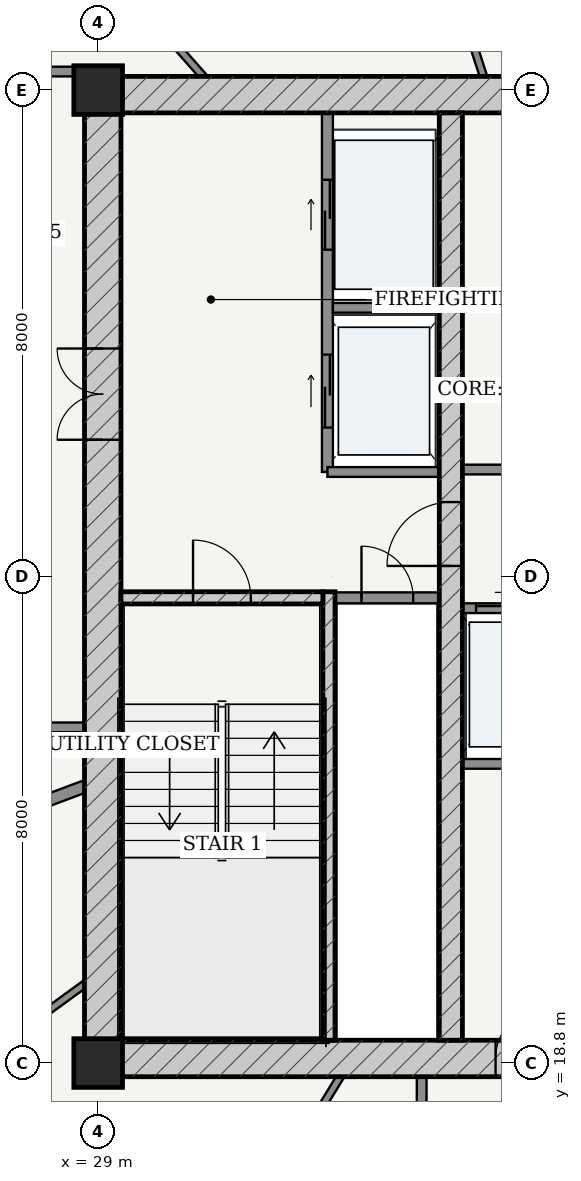
"""IFC4 building model, lengths in metres.
Left out: names, types, materials, properties, quantities, classifications, styles, units other than length and angle.
Written with IfcOpenShell. Run it as: python <this file> out.ifc"""

import sys

from ifc_helpers import new_model, si_unit, direction, frame, frame_2d, origin, origin_2d, place, context, subcontext, project, spatial, rectangle, extrude, source, transform, mapped, element, fill, save


model = new_model("IFC4")
c1 = context("Model", 3, precision=1e-05, world=origin(), true_north=direction((-0.2419218956, 0.970295726276)))
c2 = subcontext(c1, "Body", "Model", "MODEL_VIEW")
j1 = project(units=[si_unit("LENGTHUNIT", "METRE"), si_unit("PLANEANGLEUNIT", "RADIAN")], contexts=[c1])
p1 = place(None, origin())
s1 = spatial("IfcSite", under=j1, at=p1, CompositionType="ELEMENT")
p2 = place(p1, origin())
s2 = spatial("IfcBuilding", under=s1, at=p2, CompositionType="ELEMENT")
p3 = place(p2, frame((0.0, 0.0, 206.0)))
s3 = spatial("IfcBuildingStorey", under=s2, at=p3, CompositionType="ELEMENT", Elevation=206.0)
for number, where, z_axis, x_axis in (
    (1, (29.0, 18.8, 0.0), (0.0, 0.0, 1.0), (1.0, 0.0, 0.0)),
    (2, (29.0, 34.8, 0.0), (0.0, 0.0, 1.0), (1.0, 0.0, 0.0)),
):
    element("IfcColumn", number, at=place(p3, frame(where, z_axis=z_axis, x_axis=x_axis)), inside=s3, PredefinedType="COLUMN", context=c2, shape_type="SweptSolid", body=[
        extrude(rectangle(XDim=0.8, YDim=0.8, at=origin_2d()), origin(), (0.0, 0.0, 1.0), 3.7),
    ])
p4 = place(p3, frame((28.775, 18.875, 0.0), z_axis=(0.0, 0.0, 1.0), x_axis=(1.0, 0.0, 0.0)))
e3 = element("IfcWall", 3, at=p4, inside=s3, PredefinedType="SHEAR", context=c2, shape_type="SweptSolid", body=[
    extrude(rectangle(XDim=18.45, YDim=0.6, at=frame_2d((9.225, 0.0))), origin(), (0.0, 0.0, 1.0), 3.435),
])
p5 = place(p4, frame((6.76, 0.0, 0.0)))
e4 = element("IfcOpeningElement", 4, at=p5, cuts=e3, PredefinedType="OPENING", context=c2, shape_type="SweptSolid", body=[
    extrude(rectangle(XDim=0.85, YDim=2.1, at=frame_2d((0.425, 1.05))), frame((0.0, 0.31, 0.0), z_axis=(0.0, -1.0, 0.0), x_axis=(1.0, 0.0, 0.0)), (0.0, 0.0, 1.0), 0.62),
])
p6 = place(p4, frame((8.8, 0.0, 0.0)))
e5 = element("IfcOpeningElement", 5, at=p6, cuts=e3, PredefinedType="OPENING", context=c2, shape_type="SweptSolid", body=[
    extrude(rectangle(XDim=0.85, YDim=2.1, at=frame_2d((0.425, 1.05))), frame((0.0, 0.31, 0.0), z_axis=(0.0, -1.0, 0.0), x_axis=(1.0, 0.0, 0.0)), (0.0, 0.0, 1.0), 0.62),
])
p7 = place(p4, frame((10.84, 0.0, 0.0)))
e6 = element("IfcOpeningElement", 6, at=p7, cuts=e3, PredefinedType="OPENING", context=c2, shape_type="SweptSolid", body=[
    extrude(rectangle(XDim=0.85, YDim=2.1, at=frame_2d((0.425, 1.05))), frame((0.0, 0.31, 0.0), z_axis=(0.0, -1.0, 0.0), x_axis=(1.0, 0.0, 0.0)), (0.0, 0.0, 1.0), 0.62),
])
p8 = place(p3, frame((28.775, 34.725, 0.0), z_axis=(0.0, 0.0, 1.0), x_axis=(1.0, 0.0, 0.0)))
e7 = element("IfcWall", 7, at=p8, inside=s3, PredefinedType="SHEAR", context=c2, shape_type="SweptSolid", body=[
    extrude(rectangle(XDim=18.45, YDim=0.6, at=frame_2d((9.225, 0.0))), origin(), (0.0, 0.0, 1.0), 3.435),
])
p9 = place(p3, frame((29.075, 19.175, 0.0), z_axis=(0.0, 0.0, 1.0), x_axis=(0.0, 1.0, 0.0)))
e8 = element("IfcWall", 8, at=p9, inside=s3, PredefinedType="SHEAR", context=c2, shape_type="SweptSolid", body=[
    extrude(rectangle(XDim=15.25, YDim=0.6, at=frame_2d((7.625, 0.0))), origin(), (0.0, 0.0, 1.0), 3.435),
])
p10 = place(p9, frame((9.875, 0.0, 0.0)))
e9 = element("IfcOpeningElement", 9, at=p10, cuts=e8, PredefinedType="OPENING", context=c2, shape_type="SweptSolid", body=[
    extrude(rectangle(XDim=1.5, YDim=2.2, at=frame_2d((0.75, 1.1))), frame((0.0, 0.31, 0.0), z_axis=(0.0, -1.0, 0.0), x_axis=(1.0, 0.0, 0.0)), (0.0, 0.0, 1.0), 0.62),
])
p11 = place(p3, frame((32.795, 19.175, 0.0), z_axis=(0.0, 0.0, 1.0), x_axis=(0.0, 1.0, 0.0)))
e10 = element("IfcWall", 10, at=p11, inside=s3, PredefinedType="SOLIDWALL", context=c2, shape_type="SweptSolid", body=[
    extrude(rectangle(XDim=7.375, YDim=0.2, at=frame_2d((3.688, 0.0))), origin(), (0.0, 0.0, 1.0), 3.435),
])
p12 = place(p3, frame((29.375, 26.45, 0.0), z_axis=(0.0, 0.0, 1.0), x_axis=(1.0, 0.0, 0.0)))
e11 = element("IfcWall", 11, at=p12, inside=s3, PredefinedType="SOLIDWALL", context=c2, shape_type="SweptSolid", body=[
    extrude(rectangle(XDim=3.32, YDim=0.2, at=frame_2d((1.66, 0.0))), origin(), (0.0, 0.0, 1.0), 3.435),
])
p13 = place(p12, frame((1.185, 0.0, 0.0)))
e12 = element("IfcOpeningElement", 12, at=p13, cuts=e11, PredefinedType="OPENING", context=c2, shape_type="SweptSolid", body=[
    extrude(rectangle(XDim=0.95, YDim=2.15, at=frame_2d((0.475, 1.075))), frame((0.0, 0.11, 0.0), z_axis=(0.0, -1.0, 0.0), x_axis=(1.0, 0.0, 0.0)), (0.0, 0.0, 1.0), 0.22),
])
p14 = place(p3, frame((34.8, 19.175, 0.0), z_axis=(0.0, 0.0, 1.0), x_axis=(0.0, 1.0, 0.0)))
e13 = element("IfcWall", 13, at=p14, inside=s3, PredefinedType="SHEAR", context=c2, shape_type="SweptSolid", body=[
    extrude(rectangle(XDim=15.25, YDim=0.38, at=frame_2d((7.625, 0.0))), origin(), (0.0, 0.0, 1.0), 3.435),
])
p15 = place(p14, frame((7.8, 0.0, 0.0)))
e14 = element("IfcOpeningElement", 14, at=p15, cuts=e13, PredefinedType="OPENING", context=c2, shape_type="SweptSolid", body=[
    extrude(rectangle(XDim=1.05, YDim=2.15, at=frame_2d((0.525, 1.075))), frame((0.0, 0.2, 0.0), z_axis=(0.0, -1.0, 0.0), x_axis=(1.0, 0.0, 0.0)), (0.0, 0.0, 1.0), 0.4),
])
p16 = place(p3, frame((32.9, 26.45, 0.0), z_axis=(0.0, 0.0, 1.0), x_axis=(1.0, 0.0, 0.0)))
e15 = element("IfcWall", 15, at=p16, inside=s3, PredefinedType="PARTITIONING", context=c2, shape_type="SweptSolid", body=[
    extrude(rectangle(XDim=1.71, YDim=0.18, at=frame_2d((0.855, 0.0))), origin(), (0.0, 0.0, 1.0), 3.435),
])
p17 = place(p16, frame((0.43, 0.0, 0.0)))
e16 = element("IfcOpeningElement", 16, at=p17, cuts=e15, PredefinedType="OPENING", context=c2, shape_type="SweptSolid", body=[
    extrude(rectangle(XDim=0.85, YDim=2.1, at=frame_2d((0.425, 1.05))), frame((0.0, 0.1, 0.0), z_axis=(0.0, -1.0, 0.0), x_axis=(1.0, 0.0, 0.0)), (0.0, 0.0, 1.0), 0.2),
])
p18 = place(p3, frame((32.77, 28.52, 0.0), z_axis=(0.0, 0.0, 1.0), x_axis=(0.0, 1.0, 0.0)))
e17 = element("IfcWall", 17, at=p18, inside=s3, PredefinedType="PARTITIONING", context=c2, shape_type="SweptSolid", body=[
    extrude(rectangle(XDim=5.905, YDim=0.18, at=frame_2d((2.953, 0.0))), origin(), (0.0, 0.0, 1.0), 3.435),
])
p19 = place(p18, frame((3.655, 0.0, 0.0)))
e18 = element("IfcOpeningElement", 18, at=p19, cuts=e17, PredefinedType="OPENING", context=c2, shape_type="SweptSolid", body=[
    extrude(rectangle(XDim=1.15, YDim=2.2, at=frame_2d((0.575, 1.1))), frame((0.0, 0.1, 0.0), z_axis=(0.0, -1.0, 0.0), x_axis=(1.0, 0.0, 0.0)), (0.0, 0.0, 1.0), 0.2),
])
p20 = place(p18, frame((0.73, 0.0, 0.0)))
e19 = element("IfcOpeningElement", 19, at=p20, cuts=e17, PredefinedType="OPENING", context=c2, shape_type="SweptSolid", body=[
    extrude(rectangle(XDim=1.2, YDim=2.25, at=frame_2d((0.6, 1.125))), frame((0.0, 0.1, 0.0), z_axis=(0.0, -1.0, 0.0), x_axis=(1.0, 0.0, 0.0)), (0.0, 0.0, 1.0), 0.2),
])
p21 = place(p3, frame((32.86, 31.22, 0.0), z_axis=(0.0, 0.0, 1.0), x_axis=(1.0, 0.0, 0.0)))
e20 = element("IfcWall", 20, at=p21, inside=s3, PredefinedType="PARTITIONING", context=c2, shape_type="SweptSolid", body=[
    extrude(rectangle(XDim=1.75, YDim=0.16, at=frame_2d((0.875, 0.0))), origin(), (0.0, 0.0, 1.0), 3.435),
])
p22 = place(p3, frame((32.77, 28.52, 0.0), z_axis=(0.0, 0.0, 1.0), x_axis=(1.0, 0.0, 0.0)))
e21 = element("IfcWall", 21, at=p22, inside=s3, PredefinedType="PARTITIONING", context=c2, shape_type="SweptSolid", body=[
    extrude(rectangle(XDim=1.84, YDim=0.16, at=frame_2d((0.92, 0.0))), origin(), (0.0, 0.0, 1.0), 3.435),
])
p23 = place(p3, frame((34.99, 28.56, 0.0), z_axis=(0.0, 0.0, 1.0), x_axis=(1.0, 0.0, 0.0)))
e22 = element("IfcWall", 22, at=p23, inside=s3, PredefinedType="PARTITIONING", context=c2, shape_type="SweptSolid", body=[
    extrude(rectangle(XDim=6.02, YDim=0.16, at=frame_2d((3.01, 0.0))), origin(), (0.0, 0.0, 1.0), 3.435),
])
p24 = place(p23, frame((1.025, 0.0, 0.0)))
e23 = element("IfcOpeningElement", 23, at=p24, cuts=e22, PredefinedType="OPENING", context=c2, shape_type="SweptSolid", body=[
    extrude(rectangle(XDim=0.86, YDim=2.1, at=frame_2d((0.43, 1.05))), frame((0.0, 0.09, 0.0), z_axis=(0.0, -1.0, 0.0), x_axis=(1.0, 0.0, 0.0)), (0.0, 0.0, 1.0), 0.18),
])
p25 = place(p23, frame((4.14, 0.0, 0.0)))
e24 = element("IfcOpeningElement", 24, at=p25, cuts=e22, PredefinedType="OPENING", context=c2, shape_type="SweptSolid", body=[
    extrude(rectangle(XDim=0.85, YDim=2.1, at=frame_2d((0.425, 1.05))), frame((0.0, 0.09, 0.0), z_axis=(0.0, -1.0, 0.0), x_axis=(1.0, 0.0, 0.0)), (0.0, 0.0, 1.0), 0.18),
])
p26 = place(p3, frame((34.99, 26.28, 0.0), z_axis=(0.0, 0.0, 1.0), x_axis=(1.0, 0.0, 0.0)))
e25 = element("IfcWall", 25, at=p26, inside=s3, PredefinedType="PARTITIONING", context=c2, shape_type="SweptSolid", body=[
    extrude(rectangle(XDim=6.02, YDim=0.16, at=frame_2d((3.01, 0.0))), origin(), (0.0, 0.0, 1.0), 3.435),
])
p27 = place(p26, frame((0.225, 0.0, 0.0)))
e26 = element("IfcOpeningElement", 26, at=p27, cuts=e25, PredefinedType="OPENING", context=c2, shape_type="SweptSolid", body=[
    extrude(rectangle(XDim=1.1, YDim=2.2, at=frame_2d((0.55, 1.1))), frame((0.0, 0.09, 0.0), z_axis=(0.0, -1.0, 0.0), x_axis=(1.0, 0.0, 0.0)), (0.0, 0.0, 1.0), 0.18),
])
p28 = place(p26, frame((1.705, 0.0, 0.0)))
e27 = element("IfcOpeningElement", 27, at=p28, cuts=e25, PredefinedType="OPENING", context=c2, shape_type="SweptSolid", body=[
    extrude(rectangle(XDim=1.1, YDim=2.2, at=frame_2d((0.55, 1.1))), frame((0.0, 0.09, 0.0), z_axis=(0.0, -1.0, 0.0), x_axis=(1.0, 0.0, 0.0)), (0.0, 0.0, 1.0), 0.18),
])
p29 = place(p3, frame((34.99, 23.72, 0.0), z_axis=(0.0, 0.0, 1.0), x_axis=(1.0, 0.0, 0.0)))
e28 = element("IfcWall", 28, at=p29, inside=s3, PredefinedType="PARTITIONING", context=c2, shape_type="SweptSolid", body=[
    extrude(rectangle(XDim=6.02, YDim=0.16, at=frame_2d((3.01, 0.0))), origin(), (0.0, 0.0, 1.0), 3.435),
])
for number, where, z_axis, x_axis in (
    (29, (26.845, 35.105, 0.0), (0.0, 0.0, 1.0), (1.0, 0.0, 0.0)),
    (30, (26.845, 24.32, 0.0), (0.0, 0.0, 1.0), (1.0, 0.0, 0.0)),
):
    element("IfcWall", number, at=place(p3, frame(where, z_axis=z_axis, x_axis=x_axis)), inside=s3, PredefinedType="PARTITIONING", context=c2, shape_type="SweptSolid", body=[
        extrude(rectangle(XDim=1.93, YDim=0.16, at=frame_2d((0.965, 0.0))), origin(), (0.0, 0.0, 1.0), 3.435),
    ])
p30 = place(p3, frame((34.32, 16.725, 0.0), z_axis=(0.0, 0.0, 1.0), x_axis=(0.0, 1.0, 0.0)))
e31 = element("IfcWall", 31, at=p30, inside=s3, PredefinedType="PARTITIONING", context=c2, shape_type="SweptSolid", body=[
    extrude(rectangle(XDim=1.85, YDim=0.16, at=frame_2d((0.925, 0.0))), origin(), (0.0, 0.0, 1.0), 3.435),
])
p31 = place(p3, frame((35.336, 35.027, 0.0), z_axis=(0.0, 0.0, 1.0), x_axis=(-0.308083476138, 0.951359328398, 0.0)))
e32 = element("IfcWall", 32, at=p31, inside=s3, PredefinedType="PARTITIONING", context=c2, shape_type="SweptSolid", body=[
    extrude(rectangle(XDim=2.396, YDim=0.12, at=frame_2d((1.198, 0.0))), origin(), (0.0, 0.0, 1.0), 2.52),
])
p32 = place(p3, frame((30.726, 35.027, 0.0), z_axis=(0.0, 0.0, 1.0), x_axis=(-0.662398427862, 0.749151735475, 0.0)))
e33 = element("IfcWall", 33, at=p32, inside=s3, PredefinedType="PARTITIONING", context=c2, shape_type="SweptSolid", body=[
    extrude(rectangle(XDim=3.273, YDim=0.12, at=frame_2d((1.636, 0.0))), origin(), (0.0, 0.0, 1.0), 3.435),
])
p33 = place(p3, frame((28.775, 23.347, 0.0), z_axis=(0.0, 0.0, 1.0), x_axis=(-0.936537569358, -0.350567227761, 0.0)))
e34 = element("IfcWall", 34, at=p33, inside=s3, PredefinedType="PARTITIONING", context=c2, shape_type="SweptSolid", body=[
    extrude(rectangle(XDim=11.594, YDim=0.2, at=frame_2d((5.797, 0.0))), origin(), (0.0, 0.0, 1.0), 2.951),
])
p34 = place(p3, frame((28.775, 20.094, 0.0), z_axis=(0.0, 0.0, 1.0), x_axis=(-0.808862864425, -0.587997335499, 0.0)))
e35 = element("IfcWall", 35, at=p34, inside=s3, PredefinedType="PARTITIONING", context=c2, shape_type="SweptSolid", body=[
    extrude(rectangle(XDim=2.831, YDim=0.12, at=frame_2d((1.416, 0.0))), origin(), (0.0, 0.0, 1.0), 3.435),
])
p35 = place(p3, frame((32.981, 18.575, 0.0), z_axis=(0.0, 0.0, 1.0), x_axis=(-0.520926540997, -0.853601510592, 0.0)))
e36 = element("IfcWall", 36, at=p35, inside=s3, PredefinedType="PARTITIONING", context=c2, shape_type="SweptSolid", body=[
    extrude(rectangle(XDim=2.679, YDim=0.12, at=frame_2d((1.34, 0.0))), origin(), (0.0, 0.0, 1.0), 3.435),
])
m1 = source(origin(), c2, "Body", "SweptSolid", [
    extrude(rectangle(XDim=1.5, YDim=2.2, at=frame_2d((0.75, 1.1))), frame((0.0, 0.025, 0.0), z_axis=(0.0, -1.0, 0.0), x_axis=(1.0, 0.0, 0.0)), (0.0, 0.0, 1.0), 0.05),
])
p36 = place(p10, origin())
e37 = element("IfcDoor", 37, at=p36, inside=s3, OperationType="DOUBLE_DOOR_SINGLE_SWING", PredefinedType="DOOR", context=c2, shape_type="MappedRepresentation", body=[
    mapped(m1, transform((0.0, 0.0, 0.0), scale=1.0)),
])
fill(e9, e37)
m2 = source(origin(), c2, "Body", "SweptSolid", [
    extrude(rectangle(XDim=1.05, YDim=2.15, at=frame_2d((0.525, 1.075))), frame((0.0, 0.025, 0.0), z_axis=(0.0, -1.0, 0.0), x_axis=(1.0, 0.0, 0.0)), (0.0, 0.0, 1.0), 0.05),
])
p37 = place(p15, origin())
e38 = element("IfcDoor", 38, at=p37, inside=s3, OperationType="SINGLE_SWING_LEFT", PredefinedType="DOOR", context=c2, shape_type="MappedRepresentation", body=[
    mapped(m2, transform((0.0, 0.0, 0.0), scale=1.0)),
])
fill(e14, e38)
m3 = source(origin(), c2, "Body", "SweptSolid", [
    extrude(rectangle(XDim=0.95, YDim=2.15, at=frame_2d((0.475, 1.075))), frame((0.0, 0.025, 0.0), z_axis=(0.0, -1.0, 0.0), x_axis=(1.0, 0.0, 0.0)), (0.0, 0.0, 1.0), 0.05),
])
p38 = place(p13, origin())
e39 = element("IfcDoor", 39, at=p38, inside=s3, OperationType="SINGLE_SWING_LEFT", PredefinedType="DOOR", context=c2, shape_type="MappedRepresentation", body=[
    mapped(m3, transform((0.0, 0.0, 0.0), scale=1.0)),
])
fill(e12, e39)
m4 = source(origin(), c2, "Body", "SweptSolid", [
    extrude(rectangle(XDim=0.85, YDim=2.1, at=frame_2d((0.425, 1.05))), frame((0.0, 0.025, 0.0), z_axis=(0.0, -1.0, 0.0), x_axis=(1.0, 0.0, 0.0)), (0.0, 0.0, 1.0), 0.05),
])
p39 = place(p17, origin())
e40 = element("IfcDoor", 40, at=p39, inside=s3, OperationType="SINGLE_SWING_LEFT", PredefinedType="DOOR", context=c2, shape_type="MappedRepresentation", body=[
    mapped(m4, transform((0.0, 0.0, 0.0), scale=1.0)),
])
fill(e16, e40)
p40 = place(p5, origin())
e41 = element("IfcDoor", 41, at=p40, inside=s3, OperationType="SINGLE_SWING_RIGHT", PredefinedType="DOOR", context=c2, shape_type="MappedRepresentation", body=[
    mapped(m4, transform((0.0, 0.0, 0.0), scale=1.0)),
])
fill(e4, e41)
m5 = source(origin(), c2, "Body", "SweptSolid", [
    extrude(rectangle(XDim=1.15, YDim=2.2, at=frame_2d((0.575, 1.1))), frame((0.0, 0.025, 0.0), z_axis=(0.0, -1.0, 0.0), x_axis=(1.0, 0.0, 0.0)), (0.0, 0.0, 1.0), 0.05),
])
p41 = place(p19, origin())
e42 = element("IfcDoor", 42, at=p41, inside=s3, OperationType="DOUBLE_DOOR_SLIDING", PredefinedType="DOOR", context=c2, shape_type="MappedRepresentation", body=[
    mapped(m5, transform((0.0, 0.0, 0.0), scale=1.0)),
])
fill(e18, e42)
m6 = source(origin(), c2, "Body", "SweptSolid", [
    extrude(rectangle(XDim=1.2, YDim=2.25, at=frame_2d((0.6, 1.125))), frame((0.0, 0.025, 0.0), z_axis=(0.0, -1.0, 0.0), x_axis=(1.0, 0.0, 0.0)), (0.0, 0.0, 1.0), 0.05),
])
p42 = place(p20, origin())
e43 = element("IfcDoor", 43, at=p42, inside=s3, OperationType="DOUBLE_DOOR_SLIDING", PredefinedType="DOOR", context=c2, shape_type="MappedRepresentation", body=[
    mapped(m6, transform((0.0, 0.0, 0.0), scale=1.0)),
])
fill(e19, e43)
m7 = source(origin(), c2, "Body", "SweptSolid", [
    extrude(rectangle(XDim=1.1, YDim=2.2, at=frame_2d((0.55, 1.1))), frame((0.0, 0.025, 0.0), z_axis=(0.0, -1.0, 0.0), x_axis=(1.0, 0.0, 0.0)), (0.0, 0.0, 1.0), 0.05),
])
p43 = place(p27, origin())
e44 = element("IfcDoor", 44, at=p43, inside=s3, OperationType="DOUBLE_DOOR_SLIDING", PredefinedType="DOOR", context=c2, shape_type="MappedRepresentation", body=[
    mapped(m7, transform((0.0, 0.0, 0.0), scale=1.0)),
])
fill(e26, e44)
save(model, sys.argv[1])
